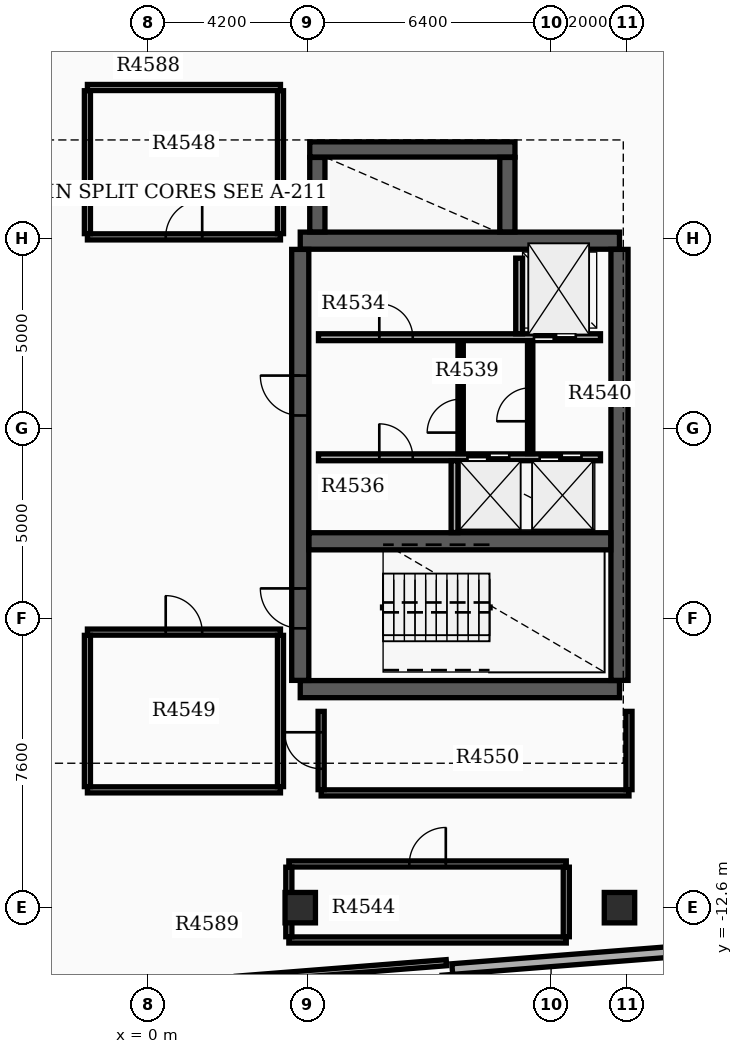
"""IFC4 building model, lengths in metres.
Left out: names, types, materials, properties, quantities, classifications, styles, units other than length and angle.
Written with IfcOpenShell. Run it as: python <this file> out.ifc"""

import sys

from ifc_helpers import new_model, si_unit, direction, frame, frame_2d, origin, origin_2d, place, context, subcontext, project, spatial, rectangle, extrude, element, fill, save


model = new_model("IFC4")
c1 = context("Model", 3, precision=1e-05, world=origin(), true_north=direction((0.0, 1.0)))
c2 = subcontext(c1, "Body", "Model", "MODEL_VIEW")
j1 = project(units=[si_unit("LENGTHUNIT", "METRE"), si_unit("PLANEANGLEUNIT", "RADIAN")], contexts=[c1])
p1 = place(None, origin())
s1 = spatial("IfcSite", under=j1, at=p1, CompositionType="ELEMENT")
p2 = place(p1, origin())
s2 = spatial("IfcBuilding", under=s1, at=p2, CompositionType="ELEMENT")
p3 = place(p2, frame((0.0, 0.0, 285.0)))
s3 = spatial("IfcBuildingStorey", under=s2, at=p3, CompositionType="ELEMENT", Elevation=285.0)
for number, where, z_axis, x_axis in (
    (1, (4.0, -6.85, 0.0), (0.0, 0.0, 1.0), (1.0, 0.0, 0.0)),
    (2, (4.0, 4.95, 0.0), (0.0, 0.0, 1.0), (1.0, 0.0, 0.0)),
):
    element("IfcWall", number, at=place(p3, frame(where, z_axis=z_axis, x_axis=x_axis)), inside=s3, PredefinedType="SHEAR", context=c2, shape_type="SweptSolid", body=[
        extrude(rectangle(XDim=8.4, YDim=0.45, at=frame_2d((4.2, 0.0))), origin(), (0.0, 0.0, 1.0), 3.65),
    ])
p4 = place(p3, frame((4.0, -6.62, 0.0), z_axis=(0.0, 0.0, 1.0), x_axis=(0.0, 1.0, 0.0)))
e3 = element("IfcWall", 3, at=p4, inside=s3, PredefinedType="SHEAR", context=c2, shape_type="SweptSolid", body=[
    extrude(rectangle(XDim=11.34, YDim=0.45, at=frame_2d((5.67, 0.0))), origin(), (0.0, 0.0, 1.0), 3.65),
])
p5 = place(p4, frame((1.37, 0.0, 0.0)))
e4 = element("IfcOpeningElement", 4, at=p5, cuts=e3, PredefinedType="OPENING", context=c2, shape_type="SweptSolid", body=[
    extrude(rectangle(XDim=1.05, YDim=2.15, at=frame_2d((0.525, 1.075))), frame((0.0, 0.235, 0.0), z_axis=(0.0, -1.0, 0.0), x_axis=(1.0, 0.0, 0.0)), (0.0, 0.0, 1.0), 0.47),
])
p6 = place(p4, frame((6.97, 0.0, 0.0)))
e5 = element("IfcOpeningElement", 5, at=p6, cuts=e3, PredefinedType="OPENING", context=c2, shape_type="SweptSolid", body=[
    extrude(rectangle(XDim=1.05, YDim=2.15, at=frame_2d((0.525, 1.075))), frame((0.0, 0.235, 0.0), z_axis=(0.0, -1.0, 0.0), x_axis=(1.0, 0.0, 0.0)), (0.0, 0.0, 1.0), 0.47),
])
p7 = place(p3, frame((12.4, -6.62, 0.0), z_axis=(0.0, 0.0, 1.0), x_axis=(0.0, 1.0, 0.0)))
e6 = element("IfcWall", 6, at=p7, inside=s3, PredefinedType="SHEAR", context=c2, shape_type="SweptSolid", body=[
    extrude(rectangle(XDim=11.34, YDim=0.45, at=frame_2d((5.67, 0.0))), origin(), (0.0, 0.0, 1.0), 3.65),
])
p8 = place(p3, frame((4.23, -2.96, 0.0), z_axis=(0.0, 0.0, 1.0), x_axis=(1.0, 0.0, 0.0)))
e7 = element("IfcWall", 7, at=p8, inside=s3, PredefinedType="SHEAR", context=c2, shape_type="SweptSolid", body=[
    extrude(rectangle(XDim=7.94, YDim=0.45, at=frame_2d((3.97, 0.0))), origin(), (0.0, 0.0, 1.0), 3.65),
])
p9 = place(p3, frame((4.45, 5.18, 0.0), z_axis=(0.0, 0.0, 1.0), x_axis=(0.0, 1.0, 0.0)))
e8 = element("IfcWall", 8, at=p9, inside=s3, PredefinedType="SHEAR", context=c2, shape_type="SweptSolid", body=[
    extrude(rectangle(XDim=1.96, YDim=0.4, at=frame_2d((0.98, 0.0))), origin(), (0.0, 0.0, 1.0), 3.65),
])
p10 = place(p3, frame((4.25, 7.35, 0.0), z_axis=(0.0, 0.0, 1.0), x_axis=(1.0, 0.0, 0.0)))
e9 = element("IfcWall", 9, at=p10, inside=s3, PredefinedType="SHEAR", context=c2, shape_type="SweptSolid", body=[
    extrude(rectangle(XDim=5.4, YDim=0.4, at=frame_2d((2.7, 0.0))), origin(), (0.0, 0.0, 1.0), 3.65),
])
p11 = place(p3, frame((9.45, 5.18, 0.0), z_axis=(0.0, 0.0, 1.0), x_axis=(0.0, 1.0, 0.0)))
e10 = element("IfcWall", 10, at=p11, inside=s3, PredefinedType="SHEAR", context=c2, shape_type="SweptSolid", body=[
    extrude(rectangle(XDim=1.96, YDim=0.4, at=frame_2d((0.98, 0.0))), origin(), (0.0, 0.0, 1.0), 3.65),
])
for number, where, z_axis, x_axis in (
    (11, (12.4, -12.6, 0.0), (0.0, 0.0, 1.0), (1.0, 0.0, 0.0)),
    (12, (4.0, -12.6, 0.0), (0.0, 0.0, 1.0), (1.0, 0.0, 0.0)),
):
    element("IfcColumn", number, at=place(p3, frame(where, z_axis=z_axis, x_axis=x_axis)), inside=s3, PredefinedType="COLUMN", context=c2, shape_type="SweptSolid", body=[
        extrude(rectangle(XDim=0.8, YDim=0.8, at=origin_2d()), origin(), (0.0, 0.0, 1.0), 3.9),
    ])
p12 = place(p3, frame((9.025, -29.021, 0.0), z_axis=(0.0, 0.0, 1.0), x_axis=(-0.078456642068, 0.996917526837, 0.0)))
e13 = element("IfcWall", 13, at=p12, inside=s3, PredefinedType="STANDARD", context=c2, shape_type="SweptSolid", body=[
    extrude(rectangle(XDim=14.7, YDim=0.28, at=frame_2d((7.35, 0.0))), origin(), (0.0, 0.0, 1.0), 3.13),
])
p13 = place(p12, frame((1.6, 0.0, 0.8)))
e14 = element("IfcOpeningElement", 14, at=p13, cuts=e13, PredefinedType="OPENING", context=c2, shape_type="SweptSolid", body=[
    extrude(rectangle(XDim=1.6, YDim=1.7, at=frame_2d((0.8, 0.85))), frame((0.0, 0.15, 0.0), z_axis=(0.0, -1.0, 0.0), x_axis=(1.0, 0.0, 0.0)), (0.0, 0.0, 1.0), 0.3),
])
p14 = place(p12, frame((5.55, 0.0, 0.8)))
e15 = element("IfcOpeningElement", 15, at=p14, cuts=e13, PredefinedType="OPENING", context=c2, shape_type="SweptSolid", body=[
    extrude(rectangle(XDim=1.6, YDim=1.7, at=frame_2d((0.8, 0.85))), frame((0.0, 0.15, 0.0), z_axis=(0.0, -1.0, 0.0), x_axis=(1.0, 0.0, 0.0)), (0.0, 0.0, 1.0), 0.3),
])
p15 = place(p12, frame((10.75, 0.0, 0.8)))
e16 = element("IfcOpeningElement", 16, at=p15, cuts=e13, PredefinedType="OPENING", context=c2, shape_type="SweptSolid", body=[
    extrude(rectangle(XDim=1.6, YDim=1.7, at=frame_2d((0.8, 0.85))), frame((0.0, 0.15, 0.0), z_axis=(0.0, -1.0, 0.0), x_axis=(1.0, 0.0, 0.0)), (0.0, 0.0, 1.0), 0.3),
])
p16 = place(p3, frame((14.238, 7.721, 0.0), z_axis=(0.0, 0.0, 1.0), x_axis=(-0.078438149236, 0.996918982036, 0.0)))
e17 = element("IfcWall", 17, at=p16, inside=s3, PredefinedType="STANDARD", context=c2, shape_type="SweptSolid", body=[
    extrude(rectangle(XDim=6.86, YDim=0.28, at=frame_2d((3.43, 0.0))), origin(), (0.0, 0.0, 1.0), 3.13),
])
p17 = place(p3, frame((14.281, -13.722, 0.0), z_axis=(0.0, 0.0, 1.0), x_axis=(-0.99691915642, -0.078435932851, 0.0)))
e18 = element("IfcWall", 18, at=p17, inside=s3, PredefinedType="STANDARD", context=c2, shape_type="SweptSolid", body=[
    extrude(rectangle(XDim=6.3, YDim=0.28, at=frame_2d((3.15, 0.0))), origin(), (0.0, 0.0, 1.0), 3.13),
])
p18 = place(p3, frame((4.48, 2.41, 0.0), z_axis=(0.0, 0.0, 1.0), x_axis=(1.0, 0.0, 0.0)))
e19 = element("IfcWall", 19, at=p18, inside=s3, PredefinedType="SOLIDWALL", context=c2, shape_type="SweptSolid", body=[
    extrude(rectangle(XDim=7.42, YDim=0.18, at=frame_2d((3.71, 0.0))), origin(), (0.0, 0.0, 1.0), 3.12),
])
p19 = place(p18, frame((5.67, 0.0, 0.0)))
e20 = element("IfcOpeningElement", 20, at=p19, cuts=e19, PredefinedType="OPENING", context=c2, shape_type="SweptSolid", body=[
    extrude(rectangle(XDim=1.1, YDim=2.15, at=frame_2d((0.55, 1.075))), frame((0.0, 0.1, 0.0), z_axis=(0.0, -1.0, 0.0), x_axis=(1.0, 0.0, 0.0)), (0.0, 0.0, 1.0), 0.2),
])
p20 = place(p18, frame((1.6, 0.0, 0.0)))
e21 = element("IfcOpeningElement", 21, at=p20, cuts=e19, PredefinedType="OPENING", context=c2, shape_type="SweptSolid", body=[
    extrude(rectangle(XDim=0.88, YDim=2.1, at=frame_2d((0.44, 1.05))), frame((0.0, 0.1, 0.0), z_axis=(0.0, -1.0, 0.0), x_axis=(1.0, 0.0, 0.0)), (0.0, 0.0, 1.0), 0.2),
])
p21 = place(p3, frame((4.48, -0.75, 0.0), z_axis=(0.0, 0.0, 1.0), x_axis=(1.0, 0.0, 0.0)))
e22 = element("IfcWall", 22, at=p21, inside=s3, PredefinedType="SOLIDWALL", context=c2, shape_type="SweptSolid", body=[
    extrude(rectangle(XDim=7.42, YDim=0.18, at=frame_2d((3.71, 0.0))), origin(), (0.0, 0.0, 1.0), 3.12),
])
p22 = place(p21, frame((3.92, 0.0, 0.0)))
e23 = element("IfcOpeningElement", 23, at=p22, cuts=e22, PredefinedType="OPENING", context=c2, shape_type="SweptSolid", body=[
    extrude(rectangle(XDim=1.1, YDim=2.15, at=frame_2d((0.55, 1.075))), frame((0.0, 0.1, 0.0), z_axis=(0.0, -1.0, 0.0), x_axis=(1.0, 0.0, 0.0)), (0.0, 0.0, 1.0), 0.2),
])
p23 = place(p21, frame((5.82, 0.0, 0.0)))
e24 = element("IfcOpeningElement", 24, at=p23, cuts=e22, PredefinedType="OPENING", context=c2, shape_type="SweptSolid", body=[
    extrude(rectangle(XDim=1.1, YDim=2.15, at=frame_2d((0.55, 1.075))), frame((0.0, 0.1, 0.0), z_axis=(0.0, -1.0, 0.0), x_axis=(1.0, 0.0, 0.0)), (0.0, 0.0, 1.0), 0.2),
])
p24 = place(p21, frame((1.6, 0.0, 0.0)))
e25 = element("IfcOpeningElement", 25, at=p24, cuts=e22, PredefinedType="OPENING", context=c2, shape_type="SweptSolid", body=[
    extrude(rectangle(XDim=0.88, YDim=2.1, at=frame_2d((0.44, 1.05))), frame((0.0, 0.1, 0.0), z_axis=(0.0, -1.0, 0.0), x_axis=(1.0, 0.0, 0.0)), (0.0, 0.0, 1.0), 0.2),
])
p25 = place(p3, frame((9.76, 2.5, 0.0), z_axis=(0.0, 0.0, 1.0), x_axis=(0.0, 1.0, 0.0)))
e26 = element("IfcWall", 26, at=p25, inside=s3, PredefinedType="SOLIDWALL", context=c2, shape_type="SweptSolid", body=[
    extrude(rectangle(XDim=1.99, YDim=0.18, at=frame_2d((0.995, 0.0))), origin(), (0.0, 0.0, 1.0), 3.12),
])
p26 = place(p3, frame((8.06, -2.73, 0.0), z_axis=(0.0, 0.0, 1.0), x_axis=(0.0, 1.0, 0.0)))
e27 = element("IfcWall", 27, at=p26, inside=s3, PredefinedType="SOLIDWALL", context=c2, shape_type="SweptSolid", body=[
    extrude(rectangle(XDim=1.89, YDim=0.18, at=frame_2d((0.945, 0.0))), origin(), (0.0, 0.0, 1.0), 3.12),
])
p27 = place(p3, frame((8.22, -0.65, 0.0), z_axis=(0.0, 0.0, 1.0), x_axis=(0.0, 1.0, 0.0)))
e28 = element("IfcWall", 28, at=p27, inside=s3, PredefinedType="SOLIDWALL", context=c2, shape_type="SweptSolid", body=[
    extrude(rectangle(XDim=2.96, YDim=0.14, at=frame_2d((1.48, 0.0))), origin(), (0.0, 0.0, 1.0), 3.12),
])
p28 = place(p27, frame((0.55, 0.0, 0.0)))
e29 = element("IfcOpeningElement", 29, at=p28, cuts=e28, PredefinedType="OPENING", context=c2, shape_type="SweptSolid", body=[
    extrude(rectangle(XDim=0.88, YDim=2.1, at=frame_2d((0.44, 1.05))), frame((0.0, 0.08, 0.0), z_axis=(0.0, -1.0, 0.0), x_axis=(1.0, 0.0, 0.0)), (0.0, 0.0, 1.0), 0.16),
])
p29 = place(p3, frame((10.05, -0.652, 0.0), z_axis=(0.0, 0.0, 1.0), x_axis=(0.0, 1.0, 0.0)))
e30 = element("IfcWall", 30, at=p29, inside=s3, PredefinedType="PARTITIONING", context=c2, shape_type="SweptSolid", body=[
    extrude(rectangle(XDim=2.962, YDim=0.14, at=frame_2d((1.481, 0.0))), origin(), (0.0, 0.0, 1.0), 3.12),
])
p30 = place(p29, frame((0.85, 0.0, 0.0)))
e31 = element("IfcOpeningElement", 31, at=p30, cuts=e30, PredefinedType="OPENING", context=c2, shape_type="SweptSolid", body=[
    extrude(rectangle(XDim=0.88, YDim=2.1, at=frame_2d((0.44, 1.05))), frame((0.0, 0.08, 0.0), z_axis=(0.0, -1.0, 0.0), x_axis=(1.0, 0.0, 0.0)), (0.0, 0.0, 1.0), 0.16),
])
p31 = place(p3, frame((3.7, -13.45, 0.0), z_axis=(0.0, 0.0, 1.0), x_axis=(1.0, 0.0, 0.0)))
e32 = element("IfcWall", 32, at=p31, inside=s3, PredefinedType="PARTITIONING", context=c2, shape_type="SweptSolid", body=[
    extrude(rectangle(XDim=7.3, YDim=0.16, at=frame_2d((3.65, 0.0))), origin(), (0.0, 0.0, 1.0), 3.12),
])
p32 = place(p3, frame((3.7, -11.45, 0.0), z_axis=(0.0, 0.0, 1.0), x_axis=(1.0, 0.0, 0.0)))
e33 = element("IfcWall", 33, at=p32, inside=s3, PredefinedType="PARTITIONING", context=c2, shape_type="SweptSolid", body=[
    extrude(rectangle(XDim=7.3, YDim=0.16, at=frame_2d((3.65, 0.0))), origin(), (0.0, 0.0, 1.0), 3.12),
])
p33 = place(p32, frame((3.17, 0.0, 0.0)))
e34 = element("IfcOpeningElement", 34, at=p33, cuts=e33, PredefinedType="OPENING", context=c2, shape_type="SweptSolid", body=[
    extrude(rectangle(XDim=0.96, YDim=2.15, at=frame_2d((0.48, 1.075))), frame((0.0, 0.09, 0.0), z_axis=(0.0, -1.0, 0.0), x_axis=(1.0, 0.0, 0.0)), (0.0, 0.0, 1.0), 0.18),
])
for number, where, z_axis, x_axis in (
    (35, (3.7, -13.365, 0.0), (0.0, 0.0, 1.0), (0.0, 1.0, 0.0)),
    (36, (11.0, -13.365, 0.0), (0.0, 0.0, 1.0), (0.0, 1.0, 0.0)),
):
    element("IfcWall", number, at=place(p3, frame(where, z_axis=z_axis, x_axis=x_axis)), inside=s3, PredefinedType="PARTITIONING", context=c2, shape_type="SweptSolid", body=[
        extrude(rectangle(XDim=1.83, YDim=0.16, at=frame_2d((0.915, 0.0))), origin(), (0.0, 0.0, 1.0), 3.12),
    ])
p34 = place(p3, frame((-1.6, 5.05, 0.0), z_axis=(0.0, 0.0, 1.0), x_axis=(1.0, 0.0, 0.0)))
e37 = element("IfcWall", 37, at=p34, inside=s3, PredefinedType="PARTITIONING", context=c2, shape_type="SweptSolid", body=[
    extrude(rectangle(XDim=5.08, YDim=0.16, at=frame_2d((2.54, 0.0))), origin(), (0.0, 0.0, 1.0), 3.12),
])
p35 = place(p34, frame((2.06, 0.0, 0.0)))
e38 = element("IfcOpeningElement", 38, at=p35, cuts=e37, PredefinedType="OPENING", context=c2, shape_type="SweptSolid", body=[
    extrude(rectangle(XDim=0.96, YDim=2.15, at=frame_2d((0.48, 1.075))), frame((0.0, 0.09, 0.0), z_axis=(0.0, -1.0, 0.0), x_axis=(1.0, 0.0, 0.0)), (0.0, 0.0, 1.0), 0.18),
])
p36 = place(p3, frame((-1.6, 8.98, 0.0), z_axis=(0.0, 0.0, 1.0), x_axis=(1.0, 0.0, 0.0)))
e39 = element("IfcWall", 39, at=p36, inside=s3, PredefinedType="PARTITIONING", context=c2, shape_type="SweptSolid", body=[
    extrude(rectangle(XDim=5.08, YDim=0.16, at=frame_2d((2.54, 0.0))), origin(), (0.0, 0.0, 1.0), 3.12),
])
for number, where, z_axis, x_axis in (
    (40, (-1.6, 5.135, 0.0), (0.0, 0.0, 1.0), (0.0, 1.0, 0.0)),
    (41, (3.48, 5.135, 0.0), (0.0, 0.0, 1.0), (0.0, 1.0, 0.0)),
):
    element("IfcWall", number, at=place(p3, frame(where, z_axis=z_axis, x_axis=x_axis)), inside=s3, PredefinedType="PARTITIONING", context=c2, shape_type="SweptSolid", body=[
        extrude(rectangle(XDim=3.76, YDim=0.16, at=frame_2d((1.88, 0.0))), origin(), (0.0, 0.0, 1.0), 3.12),
    ])
p37 = place(p3, frame((-1.6, -9.5, 0.0), z_axis=(0.0, 0.0, 1.0), x_axis=(1.0, 0.0, 0.0)))
e42 = element("IfcWall", 42, at=p37, inside=s3, PredefinedType="PARTITIONING", context=c2, shape_type="SweptSolid", body=[
    extrude(rectangle(XDim=5.08, YDim=0.16, at=frame_2d((2.54, 0.0))), origin(), (0.0, 0.0, 1.0), 3.12),
])
p38 = place(p3, frame((-1.6, -5.35, 0.0), z_axis=(0.0, 0.0, 1.0), x_axis=(1.0, 0.0, 0.0)))
e43 = element("IfcWall", 43, at=p38, inside=s3, PredefinedType="PARTITIONING", context=c2, shape_type="SweptSolid", body=[
    extrude(rectangle(XDim=5.08, YDim=0.16, at=frame_2d((2.54, 0.0))), origin(), (0.0, 0.0, 1.0), 3.12),
])
p39 = place(p38, frame((2.06, 0.0, 0.0)))
e44 = element("IfcOpeningElement", 44, at=p39, cuts=e43, PredefinedType="OPENING", context=c2, shape_type="SweptSolid", body=[
    extrude(rectangle(XDim=0.96, YDim=2.15, at=frame_2d((0.48, 1.075))), frame((0.0, 0.09, 0.0), z_axis=(0.0, -1.0, 0.0), x_axis=(1.0, 0.0, 0.0)), (0.0, 0.0, 1.0), 0.18),
])
for number, where, z_axis, x_axis in (
    (45, (-1.6, -9.415, 0.0), (0.0, 0.0, 1.0), (0.0, 1.0, 0.0)),
    (46, (3.48, -9.415, 0.0), (0.0, 0.0, 1.0), (0.0, 1.0, 0.0)),
):
    element("IfcWall", number, at=place(p3, frame(where, z_axis=z_axis, x_axis=x_axis)), inside=s3, PredefinedType="PARTITIONING", context=c2, shape_type="SweptSolid", body=[
        extrude(rectangle(XDim=3.98, YDim=0.16, at=frame_2d((1.99, 0.0))), origin(), (0.0, 0.0, 1.0), 3.12),
    ])
p40 = place(p3, frame((4.55, -9.58, 0.0), z_axis=(0.0, 0.0, 1.0), x_axis=(1.0, 0.0, 0.0)))
e47 = element("IfcWall", 47, at=p40, inside=s3, PredefinedType="PARTITIONING", context=c2, shape_type="SweptSolid", body=[
    extrude(rectangle(XDim=8.1, YDim=0.16, at=frame_2d((4.05, 0.0))), origin(), (0.0, 0.0, 1.0), 3.12),
])
p41 = place(p3, frame((4.55, -9.495, 0.0), z_axis=(0.0, 0.0, 1.0), x_axis=(0.0, 1.0, 0.0)))
e48 = element("IfcWall", 48, at=p41, inside=s3, PredefinedType="PARTITIONING", context=c2, shape_type="SweptSolid", body=[
    extrude(rectangle(XDim=2.06, YDim=0.16, at=frame_2d((1.03, 0.0))), origin(), (0.0, 0.0, 1.0), 3.12),
])
p42 = place(p41, frame((0.55, 0.0, 0.0)))
e49 = element("IfcOpeningElement", 49, at=p42, cuts=e48, PredefinedType="OPENING", context=c2, shape_type="SweptSolid", body=[
    extrude(rectangle(XDim=0.96, YDim=2.15, at=frame_2d((0.48, 1.075))), frame((0.0, 0.09, 0.0), z_axis=(0.0, -1.0, 0.0), x_axis=(1.0, 0.0, 0.0)), (0.0, 0.0, 1.0), 0.18),
])
p43 = place(p3, frame((12.65, -9.495, 0.0), z_axis=(0.0, 0.0, 1.0), x_axis=(0.0, 1.0, 0.0)))
e50 = element("IfcWall", 50, at=p43, inside=s3, PredefinedType="PARTITIONING", context=c2, shape_type="SweptSolid", body=[
    extrude(rectangle(XDim=2.06, YDim=0.16, at=frame_2d((1.03, 0.0))), origin(), (0.0, 0.0, 1.0), 3.12),
])
p44 = place(p3, frame((2.323, -14.482, 0.0), z_axis=(0.0, 0.0, 1.0), x_axis=(0.996915230802, 0.078485811425, 0.0)))
e51 = element("IfcWall", 51, at=p44, inside=s3, PredefinedType="PARTITIONING", context=c2, shape_type="SweptSolid", body=[
    extrude(rectangle(XDim=5.54, YDim=0.16, at=frame_2d((2.77, 0.0))), origin(), (0.0, 0.0, 1.0), 3.12),
])
p45 = place(p5, origin())
e52 = element("IfcDoor", 52, at=p45, inside=s3, OperationType="SINGLE_SWING_RIGHT", PredefinedType="DOOR", context=c2, shape_type="SweptSolid", body=[
    extrude(rectangle(XDim=1.05, YDim=2.15, at=frame_2d((0.525, 1.075))), frame((0.0, 0.025, 0.0), z_axis=(0.0, -1.0, 0.0), x_axis=(1.0, 0.0, 0.0)), (0.0, 0.0, 1.0), 0.05),
])
fill(e4, e52)
p46 = place(p6, origin())
e53 = element("IfcDoor", 53, at=p46, inside=s3, OperationType="SINGLE_SWING_RIGHT", PredefinedType="DOOR", context=c2, shape_type="SweptSolid", body=[
    extrude(rectangle(XDim=1.05, YDim=2.15, at=frame_2d((0.525, 1.075))), frame((0.0, 0.025, 0.0), z_axis=(0.0, -1.0, 0.0), x_axis=(1.0, 0.0, 0.0)), (0.0, 0.0, 1.0), 0.05),
])
fill(e5, e53)
p47 = place(p19, origin())
e54 = element("IfcDoor", 54, at=p47, inside=s3, OperationType="DOUBLE_DOOR_SLIDING", PredefinedType="DOOR", context=c2, shape_type="SweptSolid", body=[
    extrude(rectangle(XDim=1.1, YDim=2.15, at=frame_2d((0.55, 1.075))), frame((0.0, 0.025, 0.0), z_axis=(0.0, -1.0, 0.0), x_axis=(1.0, 0.0, 0.0)), (0.0, 0.0, 1.0), 0.05),
])
fill(e20, e54)
p48 = place(p22, origin())
e55 = element("IfcDoor", 55, at=p48, inside=s3, OperationType="DOUBLE_DOOR_SLIDING", PredefinedType="DOOR", context=c2, shape_type="SweptSolid", body=[
    extrude(rectangle(XDim=1.1, YDim=2.15, at=frame_2d((0.55, 1.075))), frame((0.0, 0.025, 0.0), z_axis=(0.0, -1.0, 0.0), x_axis=(1.0, 0.0, 0.0)), (0.0, 0.0, 1.0), 0.05),
])
fill(e23, e55)
p49 = place(p23, origin())
e56 = element("IfcDoor", 56, at=p49, inside=s3, OperationType="DOUBLE_DOOR_SLIDING", PredefinedType="DOOR", context=c2, shape_type="SweptSolid", body=[
    extrude(rectangle(XDim=1.1, YDim=2.15, at=frame_2d((0.55, 1.075))), frame((0.0, 0.025, 0.0), z_axis=(0.0, -1.0, 0.0), x_axis=(1.0, 0.0, 0.0)), (0.0, 0.0, 1.0), 0.05),
])
fill(e24, e56)
p50 = place(p20, origin())
e57 = element("IfcDoor", 57, at=p50, inside=s3, OperationType="SINGLE_SWING_LEFT", PredefinedType="DOOR", context=c2, shape_type="SweptSolid", body=[
    extrude(rectangle(XDim=0.88, YDim=2.1, at=frame_2d((0.44, 1.05))), frame((0.0, 0.025, 0.0), z_axis=(0.0, -1.0, 0.0), x_axis=(1.0, 0.0, 0.0)), (0.0, 0.0, 1.0), 0.05),
])
fill(e21, e57)
p51 = place(p24, origin())
e58 = element("IfcDoor", 58, at=p51, inside=s3, OperationType="SINGLE_SWING_LEFT", PredefinedType="DOOR", context=c2, shape_type="SweptSolid", body=[
    extrude(rectangle(XDim=0.88, YDim=2.1, at=frame_2d((0.44, 1.05))), frame((0.0, 0.025, 0.0), z_axis=(0.0, -1.0, 0.0), x_axis=(1.0, 0.0, 0.0)), (0.0, 0.0, 1.0), 0.05),
])
fill(e25, e58)
p52 = place(p28, origin())
e59 = element("IfcDoor", 59, at=p52, inside=s3, OperationType="SINGLE_SWING_LEFT", PredefinedType="DOOR", context=c2, shape_type="SweptSolid", body=[
    extrude(rectangle(XDim=0.88, YDim=2.1, at=frame_2d((0.44, 1.05))), frame((0.0, 0.025, 0.0), z_axis=(0.0, -1.0, 0.0), x_axis=(1.0, 0.0, 0.0)), (0.0, 0.0, 1.0), 0.05),
])
fill(e29, e59)
p53 = place(p30, origin())
e60 = element("IfcDoor", 60, at=p53, inside=s3, OperationType="SINGLE_SWING_LEFT", PredefinedType="DOOR", context=c2, shape_type="SweptSolid", body=[
    extrude(rectangle(XDim=0.88, YDim=2.1, at=frame_2d((0.44, 1.05))), frame((0.0, 0.025, 0.0), z_axis=(0.0, -1.0, 0.0), x_axis=(1.0, 0.0, 0.0)), (0.0, 0.0, 1.0), 0.05),
])
fill(e31, e60)
p54 = place(p33, origin())
e61 = element("IfcDoor", 61, at=p54, inside=s3, OperationType="SINGLE_SWING_RIGHT", PredefinedType="DOOR", context=c2, shape_type="SweptSolid", body=[
    extrude(rectangle(XDim=0.96, YDim=2.15, at=frame_2d((0.48, 1.075))), frame((0.0, 0.025, 0.0), z_axis=(0.0, -1.0, 0.0), x_axis=(1.0, 0.0, 0.0)), (0.0, 0.0, 1.0), 0.05),
])
fill(e34, e61)
p55 = place(p35, origin())
e62 = element("IfcDoor", 62, at=p55, inside=s3, OperationType="SINGLE_SWING_RIGHT", PredefinedType="DOOR", context=c2, shape_type="SweptSolid", body=[
    extrude(rectangle(XDim=0.96, YDim=2.15, at=frame_2d((0.48, 1.075))), frame((0.0, 0.025, 0.0), z_axis=(0.0, -1.0, 0.0), x_axis=(1.0, 0.0, 0.0)), (0.0, 0.0, 1.0), 0.05),
])
fill(e38, e62)
p56 = place(p39, origin())
e63 = element("IfcDoor", 63, at=p56, inside=s3, OperationType="SINGLE_SWING_LEFT", PredefinedType="DOOR", context=c2, shape_type="SweptSolid", body=[
    extrude(rectangle(XDim=0.96, YDim=2.15, at=frame_2d((0.48, 1.075))), frame((0.0, 0.025, 0.0), z_axis=(0.0, -1.0, 0.0), x_axis=(1.0, 0.0, 0.0)), (0.0, 0.0, 1.0), 0.05),
])
fill(e44, e63)
p57 = place(p42, origin())
e64 = element("IfcDoor", 64, at=p57, inside=s3, OperationType="SINGLE_SWING_RIGHT", PredefinedType="DOOR", context=c2, shape_type="SweptSolid", body=[
    extrude(rectangle(XDim=0.96, YDim=2.15, at=frame_2d((0.48, 1.075))), frame((0.0, 0.025, 0.0), z_axis=(0.0, -1.0, 0.0), x_axis=(1.0, 0.0, 0.0)), (0.0, 0.0, 1.0), 0.05),
])
fill(e49, e64)
save(model, sys.argv[1])
